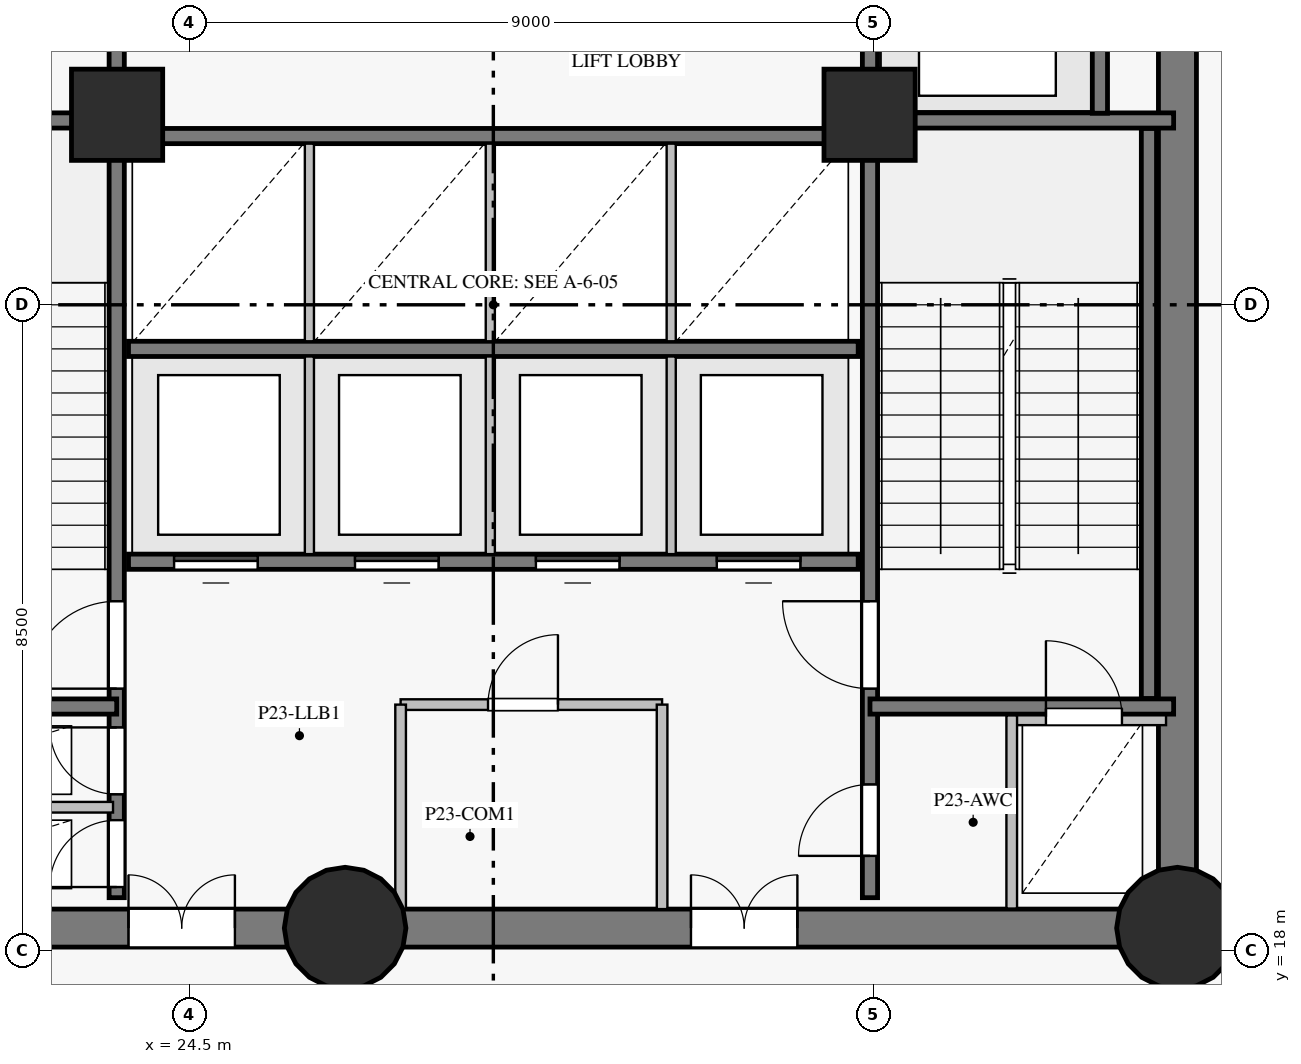
"""IFC4 building model, lengths in metres.
Left out: names, types, materials, properties, quantities, classifications, styles, units other than length and angle.
Written with IfcOpenShell. Run it as: python <this file> out.ifc"""

import sys

from ifc_helpers import new_model, si_unit, direction, frame, frame_2d, origin, origin_with_axes, origin_2d, place, context, subcontext, project, spatial, rectangle, circle, extrude, source, transform, mapped, element, fill, save


model = new_model("IFC4")
c1 = context("Model", 3, precision=1e-05, world=origin(), true_north=direction((0.0, 1.0)))
c2 = subcontext(c1, "Body", "Model", "MODEL_VIEW")
j1 = project(units=[si_unit("LENGTHUNIT", "METRE"), si_unit("PLANEANGLEUNIT", "RADIAN")], contexts=[c1])
p1 = place(None, origin())
s1 = spatial("IfcSite", under=j1, at=p1, CompositionType="ELEMENT")
p2 = place(p1, origin())
s2 = spatial("IfcBuilding", under=s1, at=p2, CompositionType="ELEMENT")
p3 = place(p2, frame((0.0, 0.0, 87.7)))
s3 = spatial("IfcBuildingStorey", under=s2, at=p3, CompositionType="ELEMENT", Elevation=87.7)
p4 = place(p3, frame((19.5, 18.3, 0.0), z_axis=(0.0, 0.0, 1.0), x_axis=(1.0, 0.0, 0.0)))
e1 = element("IfcWall", 1, at=p4, inside=s3, PredefinedType="SHEAR", context=c2, shape_type="SweptSolid", body=[
    extrude(rectangle(XDim=7.05, YDim=0.5, at=frame_2d((3.525, 0.0))), origin(), (0.0, 0.0, 1.0), 4.275),
])
p5 = place(p4, frame((4.2, 0.0, 0.0)))
e2 = element("IfcOpeningElement", 2, at=p5, cuts=e1, PredefinedType="OPENING", context=c2, shape_type="SweptSolid", body=[
    extrude(rectangle(XDim=1.4, YDim=2.2, at=frame_2d((0.7, 1.1))), frame((0.0, 0.26, 0.0), z_axis=(0.0, -1.0, 0.0), x_axis=(1.0, 0.0, 0.0)), (0.0, 0.0, 1.0), 0.52),
])
p6 = place(p3, frame((26.55, 18.3, 0.0), z_axis=(0.0, 0.0, 1.0), x_axis=(1.0, 0.0, 0.0)))
e3 = element("IfcWall", 3, at=p6, inside=s3, PredefinedType="SHEAR", context=c2, shape_type="SweptSolid", body=[
    extrude(rectangle(XDim=10.95, YDim=0.5, at=frame_2d((5.475, 0.0))), origin(), (0.0, 0.0, 1.0), 4.275),
])
p7 = place(p6, frame((4.55, 0.0, 0.0)))
e4 = element("IfcOpeningElement", 4, at=p7, cuts=e3, PredefinedType="OPENING", context=c2, shape_type="SweptSolid", body=[
    extrude(rectangle(XDim=1.4, YDim=2.2, at=frame_2d((0.7, 1.1))), frame((0.0, 0.26, 0.0), z_axis=(0.0, -1.0, 0.0), x_axis=(1.0, 0.0, 0.0)), (0.0, 0.0, 1.0), 0.52),
])
p8 = place(p3, frame((37.5, 18.3, 0.0), z_axis=(0.0, 0.0, 1.0), x_axis=(0.0, 1.0, 0.0)))
e5 = element("IfcWall", 5, at=p8, inside=s3, PredefinedType="SHEAR", context=c2, shape_type="SweptSolid", body=[
    extrude(rectangle(XDim=16.4, YDim=0.5, at=frame_2d((8.2, 0.0))), origin(), (0.0, 0.0, 1.0), 4.275),
])
p9 = place(p8, frame((14.06, 0.0, 0.0)))
e6 = element("IfcOpeningElement", 6, at=p9, cuts=e5, PredefinedType="OPENING", context=c2, shape_type="SweptSolid", body=[
    extrude(rectangle(XDim=1.2, YDim=2.15, at=frame_2d((0.6, 1.075))), frame((0.0, 0.26, 0.0), z_axis=(0.0, -1.0, 0.0), x_axis=(1.0, 0.0, 0.0)), (0.0, 0.0, 1.0), 0.52),
])
m1 = source(origin_with_axes(), c2, "Body", "SweptSolid", [
    extrude(circle(Radius=0.8, at=origin_2d()), origin(), (0.0, 0.0, 1.0), 4.5),
])
for number, where, z_axis, x_axis in (
    (7, (26.55, 18.3, 0.0), (0.0, 0.0, 1.0), (1.0, 0.0, 0.0)),
    (8, (37.5, 18.3, 0.0), (0.0, 0.0, 1.0), (1.0, 0.0, 0.0)),
):
    element("IfcColumn", number, at=place(p3, frame(where, z_axis=z_axis, x_axis=x_axis)), inside=s3, PredefinedType="COLUMN", context=c2, shape_type="MappedRepresentation", body=[
        mapped(m1, transform((0.0, 0.0, 0.0), scale=1.0)),
    ])
m2 = source(origin_with_axes(), c2, "Body", "SweptSolid", [
    extrude(rectangle(XDim=1.2, YDim=1.2, at=origin_2d()), origin(), (0.0, 0.0, 1.0), 4.5),
])
for number, where, z_axis, x_axis in (
    (9, (23.55, 29.0, 0.0), (0.0, 0.0, 1.0), (1.0, 0.0, 0.0)),
    (10, (33.45, 29.0, 0.0), (0.0, 0.0, 1.0), (1.0, 0.0, 0.0)),
):
    element("IfcColumn", number, at=place(p3, frame(where, z_axis=z_axis, x_axis=x_axis)), inside=s3, PredefinedType="COLUMN", context=c2, shape_type="MappedRepresentation", body=[
        mapped(m2, transform((0.0, 0.0, 0.0), scale=1.0)),
    ])
p10 = place(p3, frame((35.32, 21.08, 0.0), z_axis=(0.0, 0.0, 1.0), x_axis=(1.0, 0.0, 0.0)))
e11 = element("IfcWall", 11, at=p10, inside=s3, PredefinedType="SHEAR", context=c2, shape_type="SweptSolid", body=[
    extrude(rectangle(XDim=2.03, YDim=0.22, at=frame_2d((1.015, 0.0))), origin(), (0.0, 0.0, 1.0), 2.45),
])
p11 = place(p10, frame((0.45, 0.0, 0.0)))
e12 = element("IfcOpeningElement", 12, at=p11, cuts=e11, PredefinedType="OPENING", context=c2, shape_type="SweptSolid", body=[
    extrude(rectangle(XDim=1.0, YDim=2.05, at=frame_2d((0.5, 1.025))), frame((0.0, 0.12, 0.0), z_axis=(0.0, -1.0, 0.0), x_axis=(1.0, 0.0, 0.0)), (0.0, 0.0, 1.0), 0.24),
])
p12 = place(p3, frame((23.545, 18.7, 0.0), z_axis=(0.0, 0.0, 1.0), x_axis=(0.0, 1.0, 0.0)))
e13 = element("IfcWall", 13, at=p12, inside=s3, PredefinedType="SHEAR", context=c2, shape_type="SweptSolid", body=[
    extrude(rectangle(XDim=15.6, YDim=0.2, at=frame_2d((7.8, 0.0))), origin(), (0.0, 0.0, 1.0), 4.275),
])
p13 = place(p12, frame((2.75, 0.0, 0.0)))
e14 = element("IfcOpeningElement", 14, at=p13, cuts=e13, PredefinedType="OPENING", context=c2, shape_type="SweptSolid", body=[
    extrude(rectangle(XDim=1.15, YDim=2.15, at=frame_2d((0.575, 1.075))), frame((0.0, 0.11, 0.0), z_axis=(0.0, -1.0, 0.0), x_axis=(1.0, 0.0, 0.0)), (0.0, 0.0, 1.0), 0.22),
])
p14 = place(p12, frame((0.14, 0.0, 0.0)))
e15 = element("IfcOpeningElement", 15, at=p14, cuts=e13, PredefinedType="OPENING", context=c2, shape_type="SweptSolid", body=[
    extrude(rectangle(XDim=0.88, YDim=2.1, at=frame_2d((0.44, 1.05))), frame((0.0, 0.11, 0.0), z_axis=(0.0, -1.0, 0.0), x_axis=(1.0, 0.0, 0.0)), (0.0, 0.0, 1.0), 0.22),
])
p15 = place(p12, frame((1.36, 0.0, 0.0)))
e16 = element("IfcOpeningElement", 16, at=p15, cuts=e13, PredefinedType="OPENING", context=c2, shape_type="SweptSolid", body=[
    extrude(rectangle(XDim=0.88, YDim=2.1, at=frame_2d((0.44, 1.05))), frame((0.0, 0.11, 0.0), z_axis=(0.0, -1.0, 0.0), x_axis=(1.0, 0.0, 0.0)), (0.0, 0.0, 1.0), 0.22),
])
p16 = place(p12, frame((12.1, 0.0, 0.0)))
e17 = element("IfcOpeningElement", 17, at=p16, cuts=e13, PredefinedType="OPENING", context=c2, shape_type="SweptSolid", body=[
    extrude(rectangle(XDim=1.12, YDim=2.15, at=frame_2d((0.56, 1.075))), frame((0.0, 0.11, 0.0), z_axis=(0.0, -1.0, 0.0), x_axis=(1.0, 0.0, 0.0)), (0.0, 0.0, 1.0), 0.22),
])
p17 = place(p12, frame((14.05, 0.0, 0.0)))
e18 = element("IfcOpeningElement", 18, at=p17, cuts=e13, PredefinedType="OPENING", context=c2, shape_type="SweptSolid", body=[
    extrude(rectangle(XDim=1.12, YDim=2.15, at=frame_2d((0.56, 1.075))), frame((0.0, 0.11, 0.0), z_axis=(0.0, -1.0, 0.0), x_axis=(1.0, 0.0, 0.0)), (0.0, 0.0, 1.0), 0.22),
])
p18 = place(p3, frame((33.455, 18.7, 0.0), z_axis=(0.0, 0.0, 1.0), x_axis=(0.0, 1.0, 0.0)))
e19 = element("IfcWall", 19, at=p18, inside=s3, PredefinedType="SHEAR", context=c2, shape_type="SweptSolid", body=[
    extrude(rectangle(XDim=15.6, YDim=0.2, at=frame_2d((7.8, 0.0))), origin(), (0.0, 0.0, 1.0), 4.275),
])
p19 = place(p18, frame((2.75, 0.0, 0.0)))
e20 = element("IfcOpeningElement", 20, at=p19, cuts=e19, PredefinedType="OPENING", context=c2, shape_type="SweptSolid", body=[
    extrude(rectangle(XDim=1.15, YDim=2.15, at=frame_2d((0.575, 1.075))), frame((0.0, 0.11, 0.0), z_axis=(0.0, -1.0, 0.0), x_axis=(1.0, 0.0, 0.0)), (0.0, 0.0, 1.0), 0.22),
])
p20 = place(p18, frame((0.55, 0.0, 0.0)))
e21 = element("IfcOpeningElement", 21, at=p20, cuts=e19, PredefinedType="OPENING", context=c2, shape_type="SweptSolid", body=[
    extrude(rectangle(XDim=0.94, YDim=2.1, at=frame_2d((0.47, 1.05))), frame((0.0, 0.11, 0.0), z_axis=(0.0, -1.0, 0.0), x_axis=(1.0, 0.0, 0.0)), (0.0, 0.0, 1.0), 0.22),
])
p21 = place(p3, frame((23.7, 23.12, 0.0), z_axis=(0.0, 0.0, 1.0), x_axis=(1.0, 0.0, 0.0)))
e22 = element("IfcWall", 22, at=p21, inside=s3, PredefinedType="SHEAR", context=c2, shape_type="SweptSolid", body=[
    extrude(rectangle(XDim=9.6, YDim=0.2, at=frame_2d((4.8, 0.0))), origin(), (0.0, 0.0, 1.0), 4.275),
])
p22 = place(p21, frame((0.6, 0.0, 0.0)))
e23 = element("IfcOpeningElement", 23, at=p22, cuts=e22, PredefinedType="OPENING", context=c2, shape_type="SweptSolid", body=[
    extrude(rectangle(XDim=1.1, YDim=2.15, at=frame_2d((0.55, 1.075))), frame((0.0, 0.11, 0.0), z_axis=(0.0, -1.0, 0.0), x_axis=(1.0, 0.0, 0.0)), (0.0, 0.0, 1.0), 0.22),
])
p23 = place(p21, frame((2.98, 0.0, 0.0)))
e24 = element("IfcOpeningElement", 24, at=p23, cuts=e22, PredefinedType="OPENING", context=c2, shape_type="SweptSolid", body=[
    extrude(rectangle(XDim=1.1, YDim=2.15, at=frame_2d((0.55, 1.075))), frame((0.0, 0.11, 0.0), z_axis=(0.0, -1.0, 0.0), x_axis=(1.0, 0.0, 0.0)), (0.0, 0.0, 1.0), 0.22),
])
p24 = place(p21, frame((5.36, 0.0, 0.0)))
e25 = element("IfcOpeningElement", 25, at=p24, cuts=e22, PredefinedType="OPENING", context=c2, shape_type="SweptSolid", body=[
    extrude(rectangle(XDim=1.1, YDim=2.15, at=frame_2d((0.55, 1.075))), frame((0.0, 0.11, 0.0), z_axis=(0.0, -1.0, 0.0), x_axis=(1.0, 0.0, 0.0)), (0.0, 0.0, 1.0), 0.22),
])
p25 = place(p21, frame((7.74, 0.0, 0.0)))
e26 = element("IfcOpeningElement", 26, at=p25, cuts=e22, PredefinedType="OPENING", context=c2, shape_type="SweptSolid", body=[
    extrude(rectangle(XDim=1.1, YDim=2.15, at=frame_2d((0.55, 1.075))), frame((0.0, 0.11, 0.0), z_axis=(0.0, -1.0, 0.0), x_axis=(1.0, 0.0, 0.0)), (0.0, 0.0, 1.0), 0.22),
])
for number, where, z_axis, x_axis in (
    (27, (23.7, 25.92, 0.0), (0.0, 0.0, 1.0), (1.0, 0.0, 0.0)),
    (28, (23.7, 28.72, 0.0), (0.0, 0.0, 1.0), (1.0, 0.0, 0.0)),
):
    element("IfcWall", number, at=place(p3, frame(where, z_axis=z_axis, x_axis=x_axis)), inside=s3, PredefinedType="SHEAR", context=c2, shape_type="SweptSolid", body=[
        extrude(rectangle(XDim=9.6, YDim=0.2, at=frame_2d((4.8, 0.0))), origin(), (0.0, 0.0, 1.0), 4.275),
    ])
p26 = place(p3, frame((37.125, 21.32, 0.0), z_axis=(0.0, 0.0, 1.0), x_axis=(0.0, 1.0, 0.0)))
e29 = element("IfcWall", 29, at=p26, inside=s3, PredefinedType="SHEAR", context=c2, shape_type="SweptSolid", body=[
    extrude(rectangle(XDim=7.5, YDim=0.2, at=frame_2d((3.75, 0.0))), origin(), (0.0, 0.0, 1.0), 4.275),
])
for number, where, z_axis, x_axis in (
    (30, (33.455, 21.215, 0.0), (0.0, 0.0, 1.0), (1.0, 0.0, 0.0)),
    (31, (33.455, 28.925, 0.0), (0.0, 0.0, 1.0), (1.0, 0.0, 0.0)),
    (32, (19.55, 21.215, 0.0), (0.0, 0.0, 1.0), (1.0, 0.0, 0.0)),
    (33, (19.55, 28.925, 0.0), (0.0, 0.0, 1.0), (1.0, 0.0, 0.0)),
):
    element("IfcWall", number, at=place(p3, frame(where, z_axis=z_axis, x_axis=x_axis)), inside=s3, PredefinedType="SHEAR", context=c2, shape_type="SweptSolid", body=[
        extrude(rectangle(XDim=3.995, YDim=0.2, at=frame_2d((1.998, 0.0))), origin(), (0.0, 0.0, 1.0), 4.275),
    ])
p27 = place(p3, frame((36.48, 29.02, 0.0), z_axis=(0.0, 0.0, 1.0), x_axis=(0.0, 1.0, 0.0)))
e34 = element("IfcWall", 34, at=p27, inside=s3, PredefinedType="SHEAR", context=c2, shape_type="SweptSolid", body=[
    extrude(rectangle(XDim=2.86, YDim=0.2, at=frame_2d((1.43, 0.0))), origin(), (0.0, 0.0, 1.0), 4.275),
])
p28 = place(p3, frame((19.757, 19.89, 0.0), z_axis=(0.0, 0.0, 1.0), x_axis=(1.0, 0.0, 0.0)))
e35 = element("IfcWall", 35, at=p28, inside=s3, PredefinedType="PARTITIONING", context=c2, shape_type="SweptSolid", body=[
    extrude(rectangle(XDim=3.739, YDim=0.14, at=frame_2d((1.87, 0.0))), origin(), (0.0, 0.0, 1.0), 4.275),
])
p29 = place(p3, frame((27.28, 21.24, 0.0), z_axis=(0.0, 0.0, 1.0), x_axis=(1.0, 0.0, 0.0)))
e36 = element("IfcWall", 36, at=p29, inside=s3, PredefinedType="PARTITIONING", context=c2, shape_type="SweptSolid", body=[
    extrude(rectangle(XDim=3.44, YDim=0.14, at=frame_2d((1.72, 0.0))), origin(), (0.0, 0.0, 1.0), 4.275),
])
p30 = place(p29, frame((1.15, 0.0, 0.0)))
e37 = element("IfcOpeningElement", 37, at=p30, cuts=e36, PredefinedType="OPENING", context=c2, shape_type="SweptSolid", body=[
    extrude(rectangle(XDim=0.92, YDim=2.1, at=frame_2d((0.46, 1.05))), frame((0.0, 0.08, 0.0), z_axis=(0.0, -1.0, 0.0), x_axis=(1.0, 0.0, 0.0)), (0.0, 0.0, 1.0), 0.16),
])
for number, where, z_axis, x_axis in (
    (38, (27.28, 18.55, 0.0), (0.0, 0.0, 1.0), (0.0, 1.0, 0.0)),
    (39, (30.72, 18.55, 0.0), (0.0, 0.0, 1.0), (0.0, 1.0, 0.0)),
):
    element("IfcWall", number, at=place(p3, frame(where, z_axis=z_axis, x_axis=x_axis)), inside=s3, PredefinedType="PARTITIONING", context=c2, shape_type="SweptSolid", body=[
        extrude(rectangle(XDim=2.69, YDim=0.14, at=frame_2d((1.345, 0.0))), origin(), (0.0, 0.0, 1.0), 4.275),
    ])
for number, where, z_axis, x_axis in (
    (40, (26.08, 23.22, 0.0), (0.0, 0.0, 1.0), (0.0, 1.0, 0.0)),
    (41, (28.46, 23.22, 0.0), (0.0, 0.0, 1.0), (0.0, 1.0, 0.0)),
    (42, (30.84, 23.22, 0.0), (0.0, 0.0, 1.0), (0.0, 1.0, 0.0)),
    (43, (26.08, 26.02, 0.0), (0.0, 0.0, 1.0), (0.0, 1.0, 0.0)),
    (44, (28.46, 26.02, 0.0), (0.0, 0.0, 1.0), (0.0, 1.0, 0.0)),
    (45, (30.84, 26.02, 0.0), (0.0, 0.0, 1.0), (0.0, 1.0, 0.0)),
):
    element("IfcWall", number, at=place(p3, frame(where, z_axis=z_axis, x_axis=x_axis)), inside=s3, PredefinedType="PARTITIONING", context=c2, shape_type="SweptSolid", body=[
        extrude(rectangle(XDim=2.6, YDim=0.12, at=frame_2d((1.3, 0.0))), origin(), (0.0, 0.0, 1.0), 4.275),
    ])
p31 = place(p3, frame((35.32, 18.557, 0.0), z_axis=(0.0, 0.0, 1.0), x_axis=(0.0, 1.0, 0.0)))
e46 = element("IfcWall", 46, at=p31, inside=s3, PredefinedType="PARTITIONING", context=c2, shape_type="SweptSolid", body=[
    extrude(rectangle(XDim=2.541, YDim=0.14, at=frame_2d((1.271, 0.0))), origin(), (0.0, 0.0, 1.0), 4.275),
])
m3 = source(origin_with_axes(), c2, "Body", "SweptSolid", [
    extrude(rectangle(XDim=1.0, YDim=2.05, at=frame_2d((0.5, 1.025))), frame((0.0, 0.025, 0.0), z_axis=(0.0, -1.0, 0.0), x_axis=(1.0, 0.0, 0.0)), (0.0, 0.0, 1.0), 0.05),
])
p32 = place(p11, origin())
e47 = element("IfcDoor", 47, at=p32, inside=s3, OperationType="SINGLE_SWING_LEFT", PredefinedType="TRAPDOOR", context=c2, shape_type="MappedRepresentation", body=[
    mapped(m3, transform((0.0, 0.0, 0.0), scale=1.0)),
])
fill(e12, e47)
m4 = source(origin_with_axes(), c2, "Body", "SweptSolid", [
    extrude(rectangle(XDim=1.15, YDim=2.15, at=frame_2d((0.575, 1.075))), frame((0.0, 0.025, 0.0), z_axis=(0.0, -1.0, 0.0), x_axis=(1.0, 0.0, 0.0)), (0.0, 0.0, 1.0), 0.05),
])
p33 = place(p13, origin())
e48 = element("IfcDoor", 48, at=p33, inside=s3, OperationType="SINGLE_SWING_LEFT", PredefinedType="DOOR", context=c2, shape_type="MappedRepresentation", body=[
    mapped(m4, transform((0.0, 0.0, 0.0), scale=1.0)),
])
fill(e14, e48)
p34 = place(p19, origin())
e49 = element("IfcDoor", 49, at=p34, inside=s3, OperationType="SINGLE_SWING_RIGHT", PredefinedType="DOOR", context=c2, shape_type="MappedRepresentation", body=[
    mapped(m4, transform((0.0, 0.0, 0.0), scale=1.0)),
])
fill(e20, e49)
m5 = source(origin_with_axes(), c2, "Body", "SweptSolid", [
    extrude(rectangle(XDim=0.88, YDim=2.1, at=frame_2d((0.44, 1.05))), frame((0.0, 0.025, 0.0), z_axis=(0.0, -1.0, 0.0), x_axis=(1.0, 0.0, 0.0)), (0.0, 0.0, 1.0), 0.05),
])
p35 = place(p14, origin())
e50 = element("IfcDoor", 50, at=p35, inside=s3, OperationType="SINGLE_SWING_LEFT", PredefinedType="DOOR", context=c2, shape_type="MappedRepresentation", body=[
    mapped(m5, transform((0.0, 0.0, 0.0), scale=1.0)),
])
fill(e15, e50)
p36 = place(p15, origin())
e51 = element("IfcDoor", 51, at=p36, inside=s3, OperationType="SINGLE_SWING_RIGHT", PredefinedType="DOOR", context=c2, shape_type="MappedRepresentation", body=[
    mapped(m5, transform((0.0, 0.0, 0.0), scale=1.0)),
])
fill(e16, e51)
m6 = source(origin_with_axes(), c2, "Body", "SweptSolid", [
    extrude(rectangle(XDim=1.4, YDim=2.2, at=frame_2d((0.7, 1.1))), frame((0.0, 0.025, 0.0), z_axis=(0.0, -1.0, 0.0), x_axis=(1.0, 0.0, 0.0)), (0.0, 0.0, 1.0), 0.05),
])
p37 = place(p5, origin())
e52 = element("IfcDoor", 52, at=p37, inside=s3, OperationType="DOUBLE_DOOR_SINGLE_SWING", PredefinedType="DOOR", context=c2, shape_type="MappedRepresentation", body=[
    mapped(m6, transform((0.0, 0.0, 0.0), scale=1.0)),
])
fill(e2, e52)
p38 = place(p7, origin())
e53 = element("IfcDoor", 53, at=p38, inside=s3, OperationType="DOUBLE_DOOR_SINGLE_SWING", PredefinedType="DOOR", context=c2, shape_type="MappedRepresentation", body=[
    mapped(m6, transform((0.0, 0.0, 0.0), scale=1.0)),
])
fill(e4, e53)
m7 = source(origin_with_axes(), c2, "Body", "SweptSolid", [
    extrude(rectangle(XDim=0.94, YDim=2.1, at=frame_2d((0.47, 1.05))), frame((0.0, 0.025, 0.0), z_axis=(0.0, -1.0, 0.0), x_axis=(1.0, 0.0, 0.0)), (0.0, 0.0, 1.0), 0.05),
])
p39 = place(p20, origin())
e54 = element("IfcDoor", 54, at=p39, inside=s3, OperationType="SINGLE_SWING_LEFT", PredefinedType="DOOR", context=c2, shape_type="MappedRepresentation", body=[
    mapped(m7, transform((0.0, 0.0, 0.0), scale=1.0)),
])
fill(e21, e54)
m8 = source(origin_with_axes(), c2, "Body", "SweptSolid", [
    extrude(rectangle(XDim=0.92, YDim=2.1, at=frame_2d((0.46, 1.05))), frame((0.0, 0.025, 0.0), z_axis=(0.0, -1.0, 0.0), x_axis=(1.0, 0.0, 0.0)), (0.0, 0.0, 1.0), 0.05),
])
p40 = place(p30, origin())
e55 = element("IfcDoor", 55, at=p40, inside=s3, OperationType="SINGLE_SWING_RIGHT", PredefinedType="DOOR", context=c2, shape_type="MappedRepresentation", body=[
    mapped(m8, transform((0.0, 0.0, 0.0), scale=1.0)),
])
fill(e37, e55)
m9 = source(origin_with_axes(), c2, "Body", "SweptSolid", [
    extrude(rectangle(XDim=1.1, YDim=2.15, at=frame_2d((0.55, 1.075))), frame((0.0, 0.025, 0.0), z_axis=(0.0, -1.0, 0.0), x_axis=(1.0, 0.0, 0.0)), (0.0, 0.0, 1.0), 0.05),
])
p41 = place(p22, origin())
e56 = element("IfcDoor", 56, at=p41, inside=s3, OperationType="SLIDING_TO_LEFT", PredefinedType="DOOR", context=c2, shape_type="MappedRepresentation", body=[
    mapped(m9, transform((0.0, 0.0, 0.0), scale=1.0)),
])
fill(e23, e56)
p42 = place(p23, origin())
e57 = element("IfcDoor", 57, at=p42, inside=s3, OperationType="SLIDING_TO_RIGHT", PredefinedType="DOOR", context=c2, shape_type="MappedRepresentation", body=[
    mapped(m9, transform((0.0, 0.0, 0.0), scale=1.0)),
])
fill(e24, e57)
p43 = place(p24, origin())
e58 = element("IfcDoor", 58, at=p43, inside=s3, OperationType="SLIDING_TO_LEFT", PredefinedType="DOOR", context=c2, shape_type="MappedRepresentation", body=[
    mapped(m9, transform((0.0, 0.0, 0.0), scale=1.0)),
])
fill(e25, e58)
p44 = place(p25, origin())
e59 = element("IfcDoor", 59, at=p44, inside=s3, OperationType="SLIDING_TO_RIGHT", PredefinedType="DOOR", context=c2, shape_type="MappedRepresentation", body=[
    mapped(m9, transform((0.0, 0.0, 0.0), scale=1.0)),
])
fill(e26, e59)
save(model, sys.argv[1])
